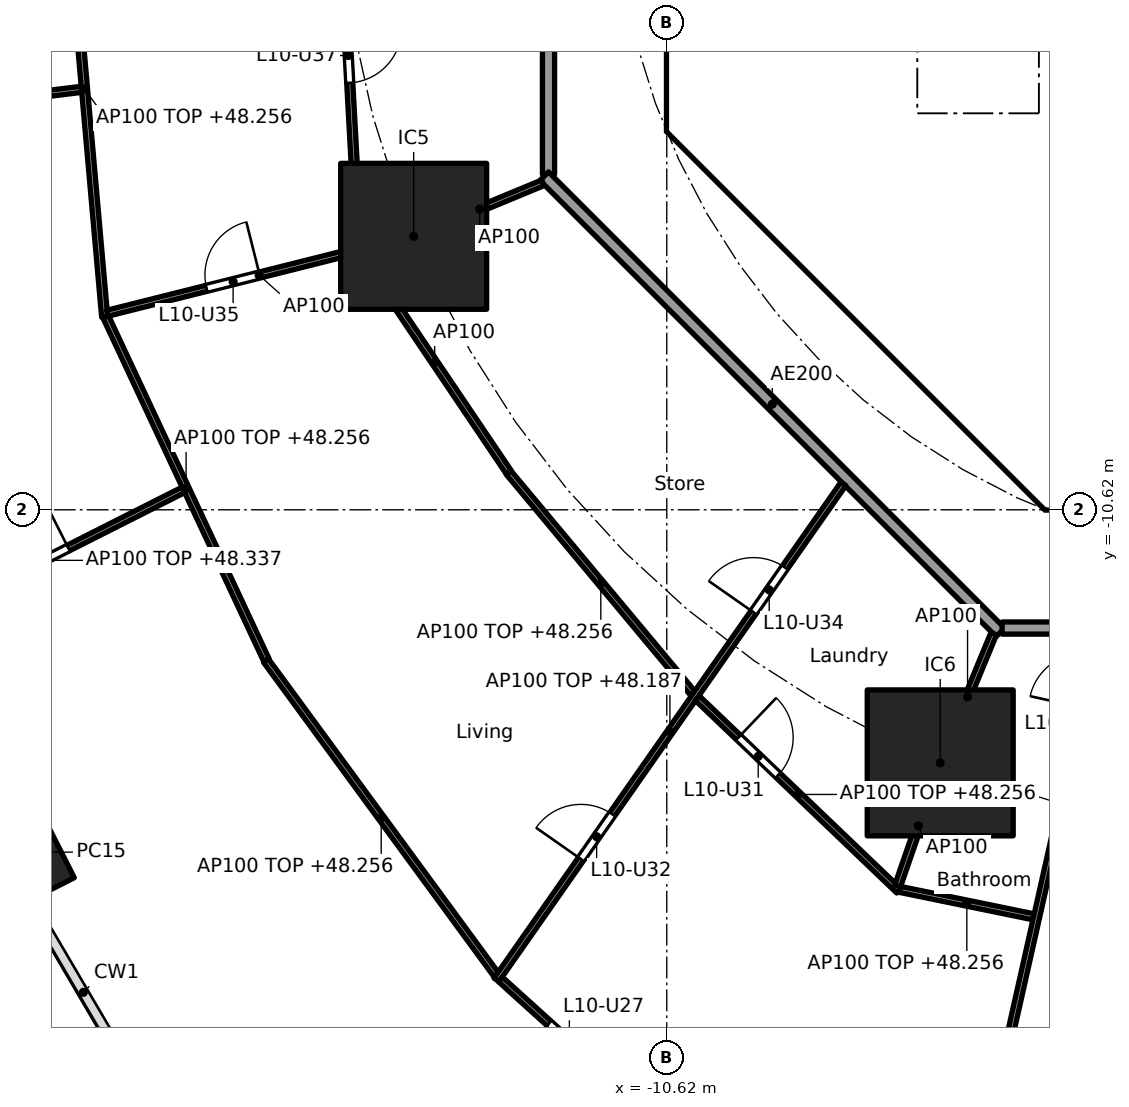
"""IFC4 building model, lengths in metres.
Left out: names, types, materials, properties, quantities, classifications, styles, units other than length and angle.
Written with IfcOpenShell. Run it as: python <this file> out.ifc"""

import sys

from ifc_helpers import new_model, si_unit, direction, frame, frame_2d, origin, origin_2d, place, context, subcontext, project, spatial, polyline, rectangle, hollow_rectangle, outline, extrude, element, fill, save


model = new_model("IFC4")
c1 = context("Model", 3, precision=1e-05, world=origin(), true_north=direction((0.0, 1.0)))
c2 = subcontext(c1, "Body", "Model", "MODEL_VIEW")
j1 = project(units=[si_unit("LENGTHUNIT", "METRE"), si_unit("PLANEANGLEUNIT", "RADIAN")], contexts=[c1])
p1 = place(None, origin())
s1 = spatial("IfcSite", under=j1, at=p1, CompositionType="ELEMENT")
p2 = place(p1, origin())
s2 = spatial("IfcBuilding", under=s1, at=p2, CompositionType="ELEMENT")
p3 = place(p2, frame((0.0, 0.0, 45.5)))
s3 = spatial("IfcBuildingStorey", under=s2, at=p3, CompositionType="ELEMENT", Elevation=45.5)
p4 = place(p3, frame((-21.082, -16.25, 0.0), z_axis=(0.0, 0.0, 1.0), x_axis=(0.452462697578, -0.891783329795, 0.0)))
e1 = element("IfcColumn", 1, at=p4, inside=s3, PredefinedType="COLUMN", context=c2, shape_type="SweptSolid", body=[
    extrude(hollow_rectangle(XDim=1.4, YDim=0.9, WallThickness=0.05, at=origin_2d()), origin(), (0.0, 0.0, 1.0), 3.7),
])
for number, where, z_axis, x_axis in (
    (2, (-14.782, -6.123, 0.0), (0.0, 0.0, 1.0), (1.0, 0.0, 0.0)),
    (3, (-6.123, -14.782, 0.0), (0.0, 0.0, 1.0), (1.0, 0.0, 0.0)),
):
    element("IfcColumn", number, at=place(p3, frame(where, z_axis=z_axis, x_axis=x_axis)), inside=s3, PredefinedType="COLUMN", context=c2, shape_type="SweptSolid", body=[
        extrude(rectangle(XDim=2.4, YDim=2.4, at=origin_2d()), origin(), (0.0, 0.0, 1.0), 3.7),
    ])
p5 = place(p3, frame((-10.325, 3.801, 0.0), z_axis=(0.0, 0.0, 1.0), x_axis=(0.0, -1.0, 0.0)))
e4 = element("IfcWall", 4, at=p5, inside=s3, PredefinedType="SHEAR", context=c2, shape_type="SweptSolid", body=[
    extrude(rectangle(XDim=7.602, YDim=0.6, at=frame_2d((3.801, 0.0))), origin(), (0.0, 0.0, 1.0), 3.44),
])
p6 = place(p5, frame((0.651, 0.0, 0.0)))
e5 = element("IfcOpeningElement", 5, at=p6, cuts=e4, PredefinedType="OPENING", context=c2, shape_type="SweptSolid", body=[
    extrude(rectangle(XDim=1.5, YDim=2.1, at=frame_2d((0.75, 1.05))), frame((0.0, 0.31, 0.0), z_axis=(0.0, -1.0, 0.0), x_axis=(1.0, 0.0, 0.0)), (0.0, 0.0, 1.0), 0.62),
])
p7 = place(p5, frame((5.451, 0.0, 0.0)))
e6 = element("IfcOpeningElement", 6, at=p7, cuts=e4, PredefinedType="OPENING", context=c2, shape_type="SweptSolid", body=[
    extrude(rectangle(XDim=1.5, YDim=2.1, at=frame_2d((0.75, 1.05))), frame((0.0, 0.31, 0.0), z_axis=(0.0, -1.0, 0.0), x_axis=(1.0, 0.0, 0.0)), (0.0, 0.0, 1.0), 0.62),
])
p8 = place(p3, frame((-9.988, -4.613, 0.0), z_axis=(0.0, 0.0, 1.0), x_axis=(0.707106781187, -0.707106781187, 0.0)))
e7 = element("IfcWall", 7, at=p8, inside=s3, PredefinedType="SHEAR", context=c2, shape_type="SweptSolid", body=[
    extrude(rectangle(XDim=7.602, YDim=0.6, at=frame_2d((3.801, 0.0))), origin(), (0.0, 0.0, 1.0), 3.44),
])
p9 = place(p8, frame((6.151, 0.0, 0.0)))
e8 = element("IfcOpeningElement", 8, at=p9, cuts=e7, PredefinedType="OPENING", context=c2, shape_type="SweptSolid", body=[
    extrude(rectangle(XDim=1.1, YDim=2.1, at=frame_2d((0.55, 1.05))), frame((0.0, 0.31, 0.0), z_axis=(0.0, -1.0, 0.0), x_axis=(1.0, 0.0, 0.0)), (0.0, 0.0, 1.0), 0.62),
])
p10 = place(p3, frame((-6.2, -7.827, 0.0), z_axis=(0.0, 0.0, 1.0), x_axis=(0.0, 1.0, 0.0)))
e9 = element("IfcWall", 9, at=p10, inside=s3, PredefinedType="PARTITIONING", context=c2, shape_type="SweptSolid", body=[
    extrude(rectangle(XDim=3.527, YDim=0.15, at=frame_2d((1.763, 0.0))), origin(), (0.0, 0.0, 1.0), 3.44),
])
p11 = place(p10, frame((1.276, 0.0, 0.0)))
e10 = element("IfcOpeningElement", 10, at=p11, cuts=e9, PredefinedType="OPENING", context=c2, shape_type="SweptSolid", body=[
    extrude(rectangle(XDim=0.9, YDim=2.1, at=frame_2d((0.45, 1.05))), frame((0.0, 0.085, 0.0), z_axis=(0.0, -1.0, 0.0), x_axis=(1.0, 0.0, 0.0)), (0.0, 0.0, 1.0), 0.17),
])
p12 = place(p3, origin())
e11 = element("IfcWall", 11, at=p12, inside=s3, PredefinedType="SHEAR", context=c2, shape_type="SweptSolid", body=[
    extrude(outline(polyline([(-10.625, -3.801), (-10.025, -3.801), (-10.025, -4.152), (-9.776, -4.401), (-10.2, -4.825), (-10.625, -4.401), (-10.625, -3.801)])), origin(), (0.0, 0.0, 1.0), 3.44),
])
p13 = place(p3, origin())
e12 = element("IfcWall", 12, at=p13, inside=s3, PredefinedType="SHEAR", context=c2, shape_type="SweptSolid", body=[
    extrude(outline(polyline([(-4.152, -10.025), (4.152, -10.025), (4.401, -9.776), (4.825, -10.2), (4.401, -10.625), (-4.401, -10.625), (-4.825, -10.2), (-4.401, -9.776), (-4.152, -10.025)])), origin(), (0.0, 0.0, 1.0), 3.44),
])
p14 = place(p3, origin())
e13 = element("IfcWall", 13, at=p14, inside=s3, PredefinedType="SOLIDWALL", context=c2, shape_type="SweptSolid", body=[
    extrude(outline(polyline([(-6.7, -2.1), (-6.5, -2.1), (-6.5, -4.1), (-4.5, -4.1), (-4.5, -2.1), (-4.3, -2.1), (-4.3, -4.1), (-2.3, -4.1), (-2.3, -2.1), (-2.1, -2.1), (-2.1, -4.1), (-0.1, -4.1), (-0.1, -2.1), (0.1, -2.1), (0.1, -4.1), (2.1, -4.1), (2.1, -2.1), (2.3, -2.1), (2.3, -4.1), (4.3, -4.1), (4.3, -2.1), (4.5, -2.1), (4.5, -4.1), (6.5, -4.1), (6.5, -2.1), (6.7, -2.1), (6.7, -4.3), (-6.7, -4.3), (-6.7, -2.1)])), origin(), (0.0, 0.0, 1.0), 3.44),
])
p15 = place(p3, frame((-10.025, -4.0, 0.0), z_axis=(0.0, 0.0, 1.0), x_axis=(1.0, 0.0, 0.0)))
e14 = element("IfcWall", 14, at=p15, inside=s3, PredefinedType="PARTITIONING", context=c2, shape_type="SweptSolid", body=[
    extrude(rectangle(XDim=3.325, YDim=0.2, at=frame_2d((1.662, 0.0))), origin(), (0.0, 0.0, 1.0), 3.44),
])
p16 = place(p3, frame((-12.565, 5.304, 0.0), z_axis=(0.0, 0.0, 1.0), x_axis=(0.0, -1.0, 0.0)))
e15 = element("IfcWall", 15, at=p16, inside=s3, PredefinedType="PARTITIONING", context=c2, shape_type="SweptSolid", body=[
    extrude(rectangle(XDim=10.409, YDim=0.2, at=frame_2d((5.205, 0.0))), origin(), (0.0, 0.0, 1.0), 3.44),
])
p17 = place(p3, frame((-12.635, -5.134, 0.0), z_axis=(0.0, 0.0, 1.0), x_axis=(0.707106781187, -0.707106781187, 0.0)))
e16 = element("IfcWall", 16, at=p17, inside=s3, PredefinedType="PARTITIONING", context=c2, shape_type="SweptSolid", body=[
    extrude(rectangle(XDim=10.609, YDim=0.2, at=frame_2d((5.305, 0.0))), origin(), (0.0, 0.0, 1.0), 3.44),
])
p18 = place(p3, frame((-5.104, -12.565, 0.0), z_axis=(0.0, 0.0, 1.0), x_axis=(1.0, 0.0, 0.0)))
e17 = element("IfcWall", 17, at=p18, inside=s3, PredefinedType="PARTITIONING", context=c2, shape_type="SweptSolid", body=[
    extrude(rectangle(XDim=10.409, YDim=0.2, at=frame_2d((5.205, 0.0))), origin(), (0.0, 0.0, 1.0), 3.44),
])
p19 = place(p18, frame((2.87, 0.0, 0.0)))
e18 = element("IfcOpeningElement", 18, at=p19, cuts=e17, PredefinedType="OPENING", context=c2, shape_type="SweptSolid", body=[
    extrude(rectangle(XDim=1.0, YDim=2.1, at=frame_2d((0.5, 1.05))), frame((0.0, 0.11, 0.0), z_axis=(0.0, -1.0, 0.0), x_axis=(1.0, 0.0, 0.0)), (0.0, 0.0, 1.0), 0.22),
])
p20 = place(p3, frame((-16.033, 0.05, 0.0), z_axis=(0.0, 0.0, 1.0), x_axis=(0.054634315779, -0.998506430395, 0.0)))
e19 = element("IfcWall", 19, at=p20, inside=s3, PredefinedType="PARTITIONING", context=c2, shape_type="SweptSolid", body=[
    extrude(rectangle(XDim=6.359, YDim=0.1, at=frame_2d((3.179, 0.0))), origin(), (0.0, 0.0, 1.0), 2.756),
])
p21 = place(p20, frame((2.754, 0.0, 0.0)))
e20 = element("IfcOpeningElement", 20, at=p21, cuts=e19, PredefinedType="OPENING", context=c2, shape_type="SweptSolid", body=[
    extrude(rectangle(XDim=0.9, YDim=2.1, at=frame_2d((0.45, 1.05))), frame((0.0, 0.06, 0.0), z_axis=(0.0, -1.0, 0.0), x_axis=(1.0, 0.0, 0.0)), (0.0, 0.0, 1.0), 0.12),
])
p22 = place(p3, frame((-20.527, 0.05, 0.0), z_axis=(0.0, 0.0, 1.0), x_axis=(0.088135127406, -0.996108527881, 0.0)))
e21 = element("IfcWall", 21, at=p22, inside=s3, PredefinedType="PARTITIONING", context=c2, shape_type="SweptSolid", body=[
    extrude(rectangle(XDim=7.529, YDim=0.1, at=frame_2d((3.765, 0.0))), origin(), (0.0, 0.0, 1.0), 2.756),
])
p23 = place(p3, frame((-20.245, -3.706, 0.0), z_axis=(0.0, 0.0, 1.0), x_axis=(-0.992575966227, -0.121626277047, 0.0)))
e22 = element("IfcWall", 22, at=p23, inside=s3, PredefinedType="PARTITIONING", context=c2, shape_type="SweptSolid", body=[
    extrude(rectangle(XDim=4.904, YDim=0.1, at=frame_2d((2.452, 0.0))), origin(), (0.0, 0.0, 1.0), 2.837),
])
p24 = place(p23, frame((2.002, 0.0, 0.0)))
e23 = element("IfcOpeningElement", 23, at=p24, cuts=e22, PredefinedType="OPENING", context=c2, shape_type="SweptSolid", body=[
    extrude(rectangle(XDim=0.9, YDim=2.1, at=frame_2d((0.45, 1.05))), frame((0.0, 0.06, 0.0), z_axis=(0.0, -1.0, 0.0), x_axis=(1.0, 0.0, 0.0)), (0.0, 0.0, 1.0), 0.12),
])
p25 = place(p3, frame((-12.657, -5.243, 0.0), z_axis=(0.0, 0.0, 1.0), x_axis=(-0.923864733477, -0.382719158442, 0.0)))
e24 = element("IfcWall", 24, at=p25, inside=s3, PredefinedType="PARTITIONING", context=c2, shape_type="SweptSolid", body=[
    extrude(rectangle(XDim=2.25, YDim=0.1, at=frame_2d((1.125, 0.0))), origin(), (0.0, 0.0, 1.0), 3.44),
])
p26 = place(p3, frame((-14.831, -6.135, 0.0), z_axis=(0.0, 0.0, 1.0), x_axis=(-0.96988230015, -0.243574062362, 0.0)))
e25 = element("IfcWall", 25, at=p26, inside=s3, PredefinedType="PARTITIONING", context=c2, shape_type="SweptSolid", body=[
    extrude(rectangle(XDim=5.144, YDim=0.1, at=frame_2d((2.572, 0.0))), origin(), (0.0, 0.0, 1.0), 3.44),
])
p27 = place(p26, frame((2.561, 0.0, 0.0)))
e26 = element("IfcOpeningElement", 26, at=p27, cuts=e25, PredefinedType="OPENING", context=c2, shape_type="SweptSolid", body=[
    extrude(rectangle(XDim=0.9, YDim=2.1, at=frame_2d((0.45, 1.05))), frame((0.0, 0.06, 0.0), z_axis=(0.0, -1.0, 0.0), x_axis=(1.0, 0.0, 0.0)), (0.0, 0.0, 1.0), 0.12),
])
p28 = place(p3, frame((-15.655, -6.391, 0.0), z_axis=(0.0, 0.0, 1.0), x_axis=(0.559126445155, -0.82908239538, 0.0)))
e27 = element("IfcWall", 27, at=p28, inside=s3, PredefinedType="PARTITIONING", context=c2, shape_type="SweptSolid", body=[
    extrude(rectangle(XDim=4.358, YDim=0.1, at=frame_2d((2.179, 0.0))), origin(), (0.0, 0.0, 1.0), 3.44),
])
p29 = place(p3, frame((-19.847, -7.445, 0.0), z_axis=(0.0, 0.0, 1.0), x_axis=(0.423892287987, -0.905712607942, 0.0)))
e28 = element("IfcWall", 28, at=p29, inside=s3, PredefinedType="PARTITIONING", context=c2, shape_type="SweptSolid", body=[
    extrude(rectangle(XDim=6.238, YDim=0.1, at=frame_2d((3.119, 0.0))), origin(), (0.0, 0.0, 1.0), 2.756),
])
p30 = place(p3, frame((-18.569, -10.292, 0.0), z_axis=(0.0, 0.0, 1.0), x_axis=(-0.892519131357, -0.451009534446, 0.0)))
e29 = element("IfcWall", 29, at=p30, inside=s3, PredefinedType="PARTITIONING", context=c2, shape_type="SweptSolid", body=[
    extrude(rectangle(XDim=5.14, YDim=0.1, at=frame_2d((2.57, 0.0))), origin(), (0.0, 0.0, 1.0), 2.837),
])
p31 = place(p30, frame((2.12, 0.0, 0.0)))
e30 = element("IfcOpeningElement", 30, at=p31, cuts=e29, PredefinedType="OPENING", context=c2, shape_type="SweptSolid", body=[
    extrude(rectangle(XDim=0.9, YDim=2.1, at=frame_2d((0.45, 1.05))), frame((0.0, 0.06, 0.0), z_axis=(0.0, -1.0, 0.0), x_axis=(1.0, 0.0, 0.0)), (0.0, 0.0, 1.0), 0.12),
])
p32 = place(p3, frame((-13.222, -10.007, 0.0), z_axis=(0.0, 0.0, 1.0), x_axis=(0.640807748916, -0.767701393075, 0.0)))
e31 = element("IfcWall", 31, at=p32, inside=s3, PredefinedType="PARTITIONING", context=c2, shape_type="SweptSolid", body=[
    extrude(rectangle(XDim=4.737, YDim=0.1, at=frame_2d((2.368, 0.0))), origin(), (0.0, 0.0, 1.0), 2.756),
])
p33 = place(p3, frame((-17.211, -13.1, 0.0), z_axis=(0.0, 0.0, 1.0), x_axis=(0.591206785834, -0.806520016109, 0.0)))
e32 = element("IfcWall", 32, at=p33, inside=s3, PredefinedType="PARTITIONING", context=c2, shape_type="SweptSolid", body=[
    extrude(rectangle(XDim=6.41, YDim=0.1, at=frame_2d((3.205, 0.0))), origin(), (0.0, 0.0, 1.0), 2.756),
])
p34 = place(p3, frame((-7.715, -10.193, 0.0), z_axis=(0.0, 0.0, 1.0), x_axis=(-0.573126502256, -0.819466907454, 0.0)))
e33 = element("IfcWall", 33, at=p34, inside=s3, PredefinedType="PARTITIONING", context=c2, shape_type="SweptSolid", body=[
    extrude(rectangle(XDim=9.954, YDim=0.1, at=frame_2d((4.977, 0.0))), origin(), (0.0, 0.0, 1.0), 2.687),
])
p35 = place(p34, frame((6.631, 0.0, 0.0)))
e34 = element("IfcOpeningElement", 34, at=p35, cuts=e33, PredefinedType="OPENING", context=c2, shape_type="SweptSolid", body=[
    extrude(rectangle(XDim=0.9, YDim=2.1, at=frame_2d((0.45, 1.05))), frame((0.0, 0.06, 0.0), z_axis=(0.0, -1.0, 0.0), x_axis=(1.0, 0.0, 0.0)), (0.0, 0.0, 1.0), 0.12),
])
p36 = place(p34, frame((1.678, 0.0, 0.0)))
e35 = element("IfcOpeningElement", 35, at=p36, cuts=e33, PredefinedType="OPENING", context=c2, shape_type="SweptSolid", body=[
    extrude(rectangle(XDim=0.9, YDim=2.1, at=frame_2d((0.45, 1.05))), frame((0.0, 0.06, 0.0), z_axis=(0.0, -1.0, 0.0), x_axis=(1.0, 0.0, 0.0)), (0.0, 0.0, 1.0), 0.12),
])
p37 = place(p3, frame((-10.119, -13.716, 0.0), z_axis=(0.0, 0.0, 1.0), x_axis=(0.722763212502, -0.69109575216, 0.0)))
e36 = element("IfcWall", 36, at=p37, inside=s3, PredefinedType="PARTITIONING", context=c2, shape_type="SweptSolid", body=[
    extrude(rectangle(XDim=4.587, YDim=0.1, at=frame_2d((2.293, 0.0))), origin(), (0.0, 0.0, 1.0), 2.756),
])
p38 = place(p37, frame((0.938, 0.0, 0.0)))
e37 = element("IfcOpeningElement", 37, at=p38, cuts=e36, PredefinedType="OPENING", context=c2, shape_type="SweptSolid", body=[
    extrude(rectangle(XDim=0.9, YDim=2.1, at=frame_2d((0.45, 1.05))), frame((0.0, 0.06, 0.0), z_axis=(0.0, -1.0, 0.0), x_axis=(1.0, 0.0, 0.0)), (0.0, 0.0, 1.0), 0.12),
])
p39 = place(p3, frame((-13.355, -18.343, 0.0), z_axis=(0.0, 0.0, 1.0), x_axis=(0.741720189244, -0.670709445936, 0.0)))
e38 = element("IfcWall", 38, at=p39, inside=s3, PredefinedType="PARTITIONING", context=c2, shape_type="SweptSolid", body=[
    extrude(rectangle(XDim=6.209, YDim=0.1, at=frame_2d((3.104, 0.0))), origin(), (0.0, 0.0, 1.0), 2.756),
])
p40 = place(p39, frame((1.077, 0.0, 0.0)))
e39 = element("IfcOpeningElement", 39, at=p40, cuts=e38, PredefinedType="OPENING", context=c2, shape_type="SweptSolid", body=[
    extrude(rectangle(XDim=0.9, YDim=2.1, at=frame_2d((0.45, 1.05))), frame((0.0, 0.06, 0.0), z_axis=(0.0, -1.0, 0.0), x_axis=(1.0, 0.0, 0.0)), (0.0, 0.0, 1.0), 0.12),
])
p41 = place(p3, frame((-5.243, -12.657, 0.0), z_axis=(0.0, 0.0, 1.0), x_axis=(-0.382719158442, -0.923864733477, 0.0)))
e40 = element("IfcWall", 40, at=p41, inside=s3, PredefinedType="PARTITIONING", context=c2, shape_type="SweptSolid", body=[
    extrude(rectangle(XDim=2.25, YDim=0.1, at=frame_2d((1.125, 0.0))), origin(), (0.0, 0.0, 1.0), 3.44),
])
p42 = place(p3, frame((-6.139, -14.83, 0.0), z_axis=(0.0, 0.0, 1.0), x_axis=(-0.327246993321, -0.944938836837, 0.0)))
e41 = element("IfcWall", 41, at=p42, inside=s3, PredefinedType="PARTITIONING", context=c2, shape_type="SweptSolid", body=[
    extrude(rectangle(XDim=2.09, YDim=0.1, at=frame_2d((1.045, 0.0))), origin(), (0.0, 0.0, 1.0), 3.44),
])
p43 = place(p3, frame((-6.791, -16.862, 0.0), z_axis=(0.0, 0.0, 1.0), x_axis=(0.979581941859, -0.201045316246, 0.0)))
e42 = element("IfcWall", 42, at=p43, inside=s3, PredefinedType="PARTITIONING", context=c2, shape_type="SweptSolid", body=[
    extrude(rectangle(XDim=2.256, YDim=0.1, at=frame_2d((1.128, 0.0))), origin(), (0.0, 0.0, 1.0), 2.756),
])
p44 = place(p3, frame((-3.492, -12.662, 0.0), z_axis=(0.0, 0.0, 1.0), x_axis=(-0.219268088006, -0.975664648115, 0.0)))
e43 = element("IfcWall", 43, at=p44, inside=s3, PredefinedType="PARTITIONING", context=c2, shape_type="SweptSolid", body=[
    extrude(rectangle(XDim=18.23, YDim=0.1, at=frame_2d((9.115, 0.0))), origin(), (0.0, 0.0, 1.0), 2.687),
])
p45 = place(p44, frame((0.35, 0.0, 0.0)))
e44 = element("IfcOpeningElement", 44, at=p45, cuts=e43, PredefinedType="OPENING", context=c2, shape_type="SweptSolid", body=[
    extrude(rectangle(XDim=0.9, YDim=2.1, at=frame_2d((0.45, 1.05))), frame((0.0, 0.06, 0.0), z_axis=(0.0, -1.0, 0.0), x_axis=(1.0, 0.0, 0.0)), (0.0, 0.0, 1.0), 0.12),
])
p46 = place(p44, frame((7.497, 0.0, 0.0)))
e45 = element("IfcOpeningElement", 45, at=p46, cuts=e43, PredefinedType="OPENING", context=c2, shape_type="SweptSolid", body=[
    extrude(rectangle(XDim=0.9, YDim=2.1, at=frame_2d((0.45, 1.05))), frame((0.0, 0.06, 0.0), z_axis=(0.0, -1.0, 0.0), x_axis=(1.0, 0.0, 0.0)), (0.0, 0.0, 1.0), 0.12),
])
p47 = place(p11, origin())
e46 = element("IfcDoor", 46, at=p47, inside=s3, OperationType="SINGLE_SWING_RIGHT", PredefinedType="DOOR", context=c2, shape_type="SweptSolid", body=[
    extrude(rectangle(XDim=0.9, YDim=2.1, at=frame_2d((0.45, 1.05))), frame((0.0, 0.025, 0.0), z_axis=(0.0, -1.0, 0.0), x_axis=(1.0, 0.0, 0.0)), (0.0, 0.0, 1.0), 0.05),
])
fill(e10, e46)
p48 = place(p7, origin())
e47 = element("IfcDoor", 47, at=p48, inside=s3, OperationType="DOUBLE_DOOR_SINGLE_SWING", PredefinedType="DOOR", context=c2, shape_type="SweptSolid", body=[
    extrude(rectangle(XDim=1.5, YDim=2.1, at=frame_2d((0.75, 1.05))), frame((0.0, 0.025, 0.0), z_axis=(0.0, -1.0, 0.0), x_axis=(1.0, 0.0, 0.0)), (0.0, 0.0, 1.0), 0.05),
])
fill(e6, e47)
p49 = place(p9, origin())
e48 = element("IfcDoor", 48, at=p49, inside=s3, OperationType="SINGLE_SWING_RIGHT", PredefinedType="DOOR", context=c2, shape_type="SweptSolid", body=[
    extrude(rectangle(XDim=1.1, YDim=2.1, at=frame_2d((0.55, 1.05))), frame((0.0, 0.025, 0.0), z_axis=(0.0, -1.0, 0.0), x_axis=(1.0, 0.0, 0.0)), (0.0, 0.0, 1.0), 0.05),
])
fill(e8, e48)
p50 = place(p40, frame((0.9, 0.0, 0.0), x_axis=(-1.0, 0.0, 0.0)))
e49 = element("IfcDoor", 49, at=p50, inside=s3, OperationType="SINGLE_SWING_RIGHT", PredefinedType="DOOR", context=c2, shape_type="SweptSolid", body=[
    extrude(rectangle(XDim=0.9, YDim=2.1, at=frame_2d((0.45, 1.05))), frame((0.0, 0.025, 0.0), z_axis=(0.0, -1.0, 0.0), x_axis=(1.0, 0.0, 0.0)), (0.0, 0.0, 1.0), 0.05),
])
fill(e39, e49)
p51 = place(p38, origin())
e50 = element("IfcDoor", 50, at=p51, inside=s3, OperationType="SINGLE_SWING_LEFT", PredefinedType="DOOR", context=c2, shape_type="SweptSolid", body=[
    extrude(rectangle(XDim=0.9, YDim=2.1, at=frame_2d((0.45, 1.05))), frame((0.0, 0.025, 0.0), z_axis=(0.0, -1.0, 0.0), x_axis=(1.0, 0.0, 0.0)), (0.0, 0.0, 1.0), 0.05),
])
fill(e37, e50)
p52 = place(p35, frame((0.9, 0.0, 0.0), x_axis=(-1.0, 0.0, 0.0)))
e51 = element("IfcDoor", 51, at=p52, inside=s3, OperationType="SINGLE_SWING_LEFT", PredefinedType="DOOR", context=c2, shape_type="SweptSolid", body=[
    extrude(rectangle(XDim=0.9, YDim=2.1, at=frame_2d((0.45, 1.05))), frame((0.0, 0.025, 0.0), z_axis=(0.0, -1.0, 0.0), x_axis=(1.0, 0.0, 0.0)), (0.0, 0.0, 1.0), 0.05),
])
fill(e34, e51)
p53 = place(p31, frame((0.9, 0.0, 0.0), x_axis=(-1.0, 0.0, 0.0)))
e52 = element("IfcDoor", 52, at=p53, inside=s3, OperationType="SINGLE_SWING_RIGHT", PredefinedType="DOOR", context=c2, shape_type="SweptSolid", body=[
    extrude(rectangle(XDim=0.9, YDim=2.1, at=frame_2d((0.45, 1.05))), frame((0.0, 0.025, 0.0), z_axis=(0.0, -1.0, 0.0), x_axis=(1.0, 0.0, 0.0)), (0.0, 0.0, 1.0), 0.05),
])
fill(e30, e52)
p54 = place(p36, frame((0.9, 0.0, 0.0), x_axis=(-1.0, 0.0, 0.0)))
e53 = element("IfcDoor", 53, at=p54, inside=s3, OperationType="SINGLE_SWING_LEFT", PredefinedType="DOOR", context=c2, shape_type="SweptSolid", body=[
    extrude(rectangle(XDim=0.9, YDim=2.1, at=frame_2d((0.45, 1.05))), frame((0.0, 0.025, 0.0), z_axis=(0.0, -1.0, 0.0), x_axis=(1.0, 0.0, 0.0)), (0.0, 0.0, 1.0), 0.05),
])
fill(e35, e53)
p55 = place(p27, frame((0.9, 0.0, 0.0), x_axis=(-1.0, 0.0, 0.0)))
e54 = element("IfcDoor", 54, at=p55, inside=s3, OperationType="SINGLE_SWING_RIGHT", PredefinedType="DOOR", context=c2, shape_type="SweptSolid", body=[
    extrude(rectangle(XDim=0.9, YDim=2.1, at=frame_2d((0.45, 1.05))), frame((0.0, 0.025, 0.0), z_axis=(0.0, -1.0, 0.0), x_axis=(1.0, 0.0, 0.0)), (0.0, 0.0, 1.0), 0.05),
])
fill(e26, e54)
p56 = place(p21, origin())
e55 = element("IfcDoor", 55, at=p56, inside=s3, OperationType="SINGLE_SWING_LEFT", PredefinedType="DOOR", context=c2, shape_type="SweptSolid", body=[
    extrude(rectangle(XDim=0.9, YDim=2.1, at=frame_2d((0.45, 1.05))), frame((0.0, 0.025, 0.0), z_axis=(0.0, -1.0, 0.0), x_axis=(1.0, 0.0, 0.0)), (0.0, 0.0, 1.0), 0.05),
])
fill(e20, e55)
save(model, sys.argv[1])
